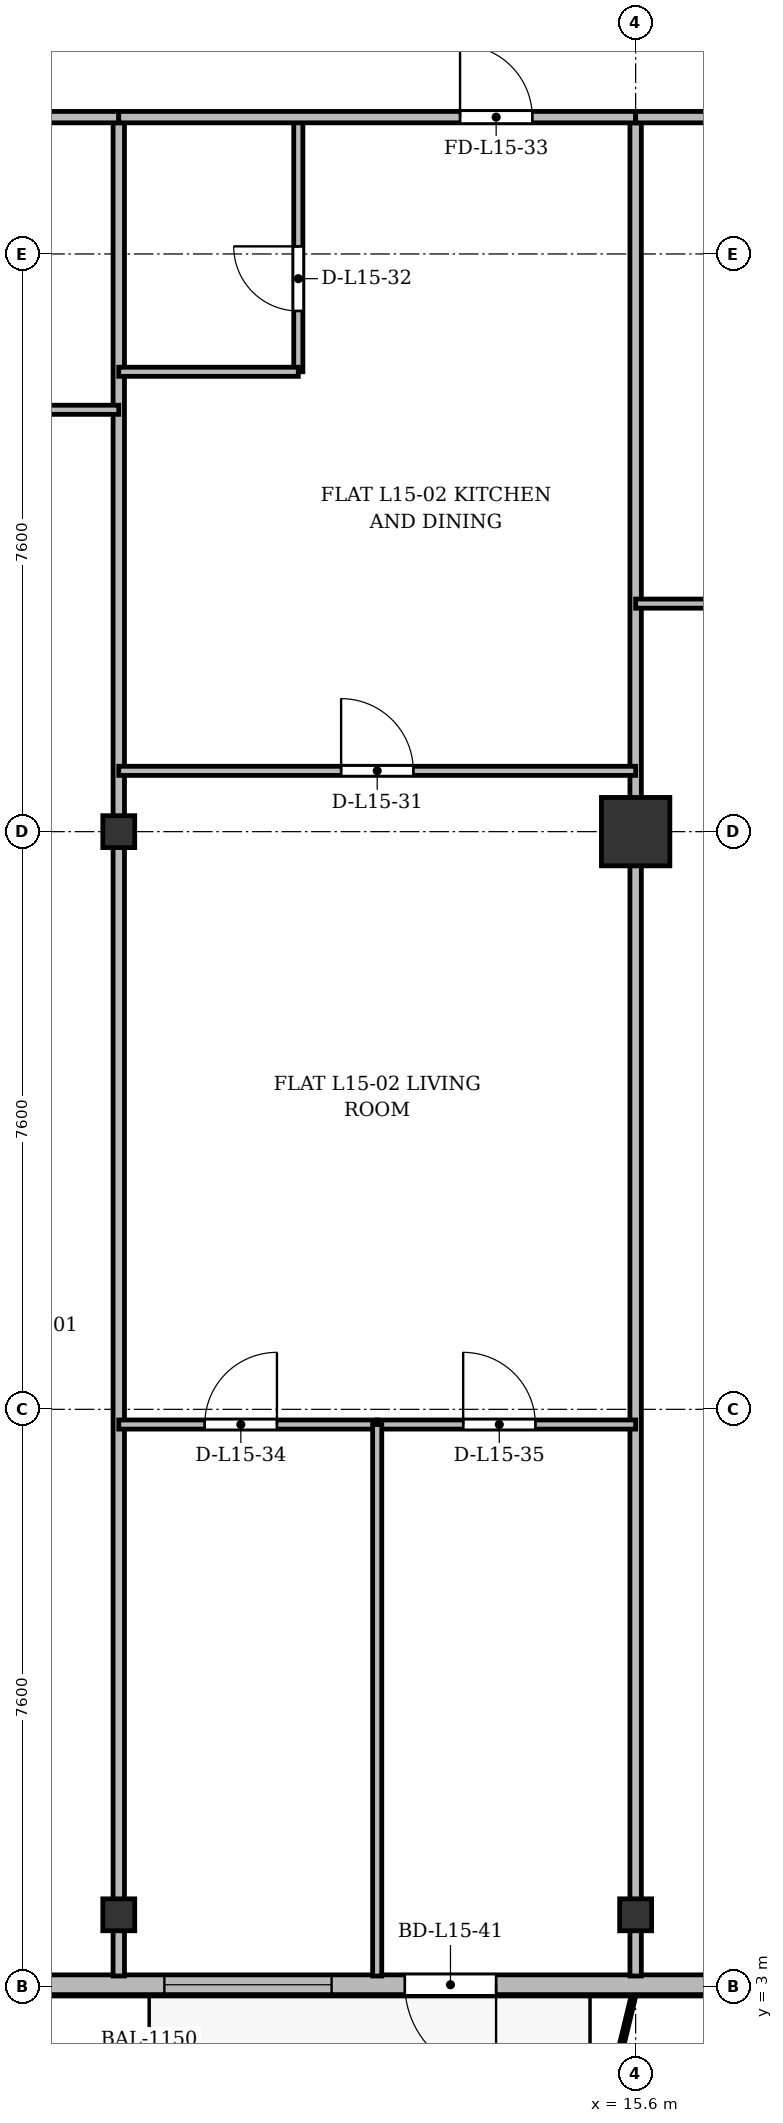
"""IFC4 building model, lengths in metres.
Left out: names, types, materials, properties, quantities, classifications, styles, units other than length and angle.
Written with IfcOpenShell. Run it as: python <this file> out.ifc"""

import sys

from ifc_helpers import new_model, si_unit, direction, frame, frame_2d, origin, origin_2d, place, context, subcontext, project, spatial, rectangle, i_section, extrude, source, transform, mapped, element, fill, save


model = new_model("IFC4")
c1 = context("Model", 3, precision=1e-05, world=origin(), true_north=direction((0.0, 1.0)))
c2 = subcontext(c1, "Body", "Model", "MODEL_VIEW")
j1 = project(units=[si_unit("LENGTHUNIT", "METRE"), si_unit("PLANEANGLEUNIT", "RADIAN")], contexts=[c1])
p1 = place(None, origin())
s1 = spatial("IfcSite", under=j1, at=p1, CompositionType="ELEMENT")
p2 = place(p1, origin())
s2 = spatial("IfcBuilding", under=s1, at=p2, CompositionType="ELEMENT")
p3 = place(p2, frame((0.0, 0.0, 59.5)))
s3 = spatial("IfcBuildingStorey", under=s2, at=p3, CompositionType="ELEMENT", Elevation=59.5)
m1 = source(origin(), c2, "Body", "SweptSolid", [
    extrude(i_section(OverallWidth=0.42, OverallDepth=0.42, WebThickness=0.026, FlangeThickness=0.04, at=origin_2d()), origin(), (0.0, 0.0, 1.0), 3.6),
])
for number, where, z_axis, x_axis in (
    (1, (8.8, 3.95, 0.0), (0.0, 0.0, 1.0), (1.0, 0.0, 0.0)),
    (2, (8.8, 18.2, 0.0), (0.0, 0.0, 1.0), (1.0, 0.0, 0.0)),
    (3, (15.6, 3.95, 0.0), (0.0, 0.0, 1.0), (1.0, 0.0, 0.0)),
):
    element("IfcColumn", number, at=place(p3, frame(where, z_axis=z_axis, x_axis=x_axis)), inside=s3, PredefinedType="COLUMN", context=c2, shape_type="MappedRepresentation", body=[
        mapped(m1, transform((0.0, 0.0, 0.0), x_axis=(1.0, 0.0, 0.0), y_axis=(0.0, 1.0, 0.0), z_axis=(0.0, 0.0, 1.0), scale=1.0)),
    ])
m2 = source(origin(), c2, "Body", "SweptSolid", [
    extrude(rectangle(XDim=0.9, YDim=0.9, at=origin_2d()), origin(), (0.0, 0.0, 1.0), 3.6),
])
p4 = place(p3, frame((15.6, 18.2, 0.0), z_axis=(0.0, 0.0, 1.0), x_axis=(1.0, 0.0, 0.0)))
e4 = element("IfcColumn", 4, at=p4, inside=s3, PredefinedType="COLUMN", context=c2, shape_type="MappedRepresentation", body=[
    mapped(m2, transform((0.0, 0.0, 0.0), x_axis=(1.0, 0.0, 0.0), y_axis=(0.0, 1.0, 0.0), z_axis=(0.0, 0.0, 1.0), scale=1.0)),
])
p5 = place(p3, frame((66.9, 3.03, 0.0), z_axis=(0.0, 0.0, 1.0), x_axis=(-1.0, 0.0, 0.0)))
e5 = element("IfcWall", 5, at=p5, inside=s3, PredefinedType="SOLIDWALL", context=c2, shape_type="SweptSolid", body=[
    extrude(rectangle(XDim=59.4, YDim=0.26, at=frame_2d((29.7, 0.0))), origin(), (0.0, 0.0, 1.0), 3.34),
])
p6 = place(p5, frame((3.6, 0.0, 0.9)))
e6 = element("IfcOpeningElement", 6, at=p6, cuts=e5, PredefinedType="OPENING", context=c2, shape_type="SweptSolid", body=[
    extrude(rectangle(XDim=2.2, YDim=1.8, at=frame_2d((1.1, 0.9))), frame((0.0, 0.14, 0.0), z_axis=(0.0, -1.0, 0.0), x_axis=(1.0, 0.0, 0.0)), (0.0, 0.0, 1.0), 0.28),
])
p7 = place(p5, frame((9.18, 0.0, 0.0)))
e7 = element("IfcOpeningElement", 7, at=p7, cuts=e5, PredefinedType="OPENING", context=c2, shape_type="SweptSolid", body=[
    extrude(rectangle(XDim=1.2, YDim=2.2, at=frame_2d((0.6, 1.1))), frame((0.0, 0.14, 0.0), z_axis=(0.0, -1.0, 0.0), x_axis=(1.0, 0.0, 0.0)), (0.0, 0.0, 1.0), 0.28),
])
p8 = place(p5, frame((12.95, 0.0, 0.9)))
e8 = element("IfcOpeningElement", 8, at=p8, cuts=e5, PredefinedType="OPENING", context=c2, shape_type="SweptSolid", body=[
    extrude(rectangle(XDim=2.0, YDim=1.95, at=frame_2d((1.0, 0.975))), frame((0.0, 0.14, 0.0), z_axis=(0.0, -1.0, 0.0), x_axis=(1.0, 0.0, 0.0)), (0.0, 0.0, 1.0), 0.28),
])
p9 = place(p5, frame((18.675, 0.0, 0.9)))
e9 = element("IfcOpeningElement", 9, at=p9, cuts=e5, PredefinedType="OPENING", context=c2, shape_type="SweptSolid", body=[
    extrude(rectangle(XDim=1.65, YDim=1.85, at=frame_2d((0.825, 0.925))), frame((0.0, 0.14, 0.0), z_axis=(0.0, -1.0, 0.0), x_axis=(1.0, 0.0, 0.0)), (0.0, 0.0, 1.0), 0.28),
])
p10 = place(p5, frame((24.1, 0.0, 0.9)))
e10 = element("IfcOpeningElement", 10, at=p10, cuts=e5, PredefinedType="OPENING", context=c2, shape_type="SweptSolid", body=[
    extrude(rectangle(XDim=1.8, YDim=1.8, at=frame_2d((0.9, 0.9))), frame((0.0, 0.14, 0.0), z_axis=(0.0, -1.0, 0.0), x_axis=(1.0, 0.0, 0.0)), (0.0, 0.0, 1.0), 0.28),
])
p11 = place(p5, frame((28.1, 0.0, 0.9)))
e11 = element("IfcOpeningElement", 11, at=p11, cuts=e5, PredefinedType="OPENING", context=c2, shape_type="SweptSolid", body=[
    extrude(rectangle(XDim=2.2, YDim=1.8, at=frame_2d((1.1, 0.9))), frame((0.0, 0.14, 0.0), z_axis=(0.0, -1.0, 0.0), x_axis=(1.0, 0.0, 0.0)), (0.0, 0.0, 1.0), 0.28),
])
p12 = place(p5, frame((33.15, 0.0, 0.9)))
e12 = element("IfcOpeningElement", 12, at=p12, cuts=e5, PredefinedType="OPENING", context=c2, shape_type="SweptSolid", body=[
    extrude(rectangle(XDim=1.5, YDim=1.75, at=frame_2d((0.75, 0.875))), frame((0.0, 0.14, 0.0), z_axis=(0.0, -1.0, 0.0), x_axis=(1.0, 0.0, 0.0)), (0.0, 0.0, 1.0), 0.28),
])
p13 = place(p5, frame((40.301, 0.0, 0.0)))
e13 = element("IfcOpeningElement", 13, at=p13, cuts=e5, PredefinedType="OPENING", context=c2, shape_type="SweptSolid", body=[
    extrude(rectangle(XDim=1.2, YDim=2.2, at=frame_2d((0.6, 1.1))), frame((0.0, 0.14, 0.0), z_axis=(0.0, -1.0, 0.0), x_axis=(1.0, 0.0, 0.0)), (0.0, 0.0, 1.0), 0.28),
])
p14 = place(p5, frame((46.575, 0.0, 0.9)))
e14 = element("IfcOpeningElement", 14, at=p14, cuts=e5, PredefinedType="OPENING", context=c2, shape_type="SweptSolid", body=[
    extrude(rectangle(XDim=1.65, YDim=1.85, at=frame_2d((0.825, 0.925))), frame((0.0, 0.14, 0.0), z_axis=(0.0, -1.0, 0.0), x_axis=(1.0, 0.0, 0.0)), (0.0, 0.0, 1.0), 0.28),
])
p15 = place(p5, frame((53.136, 0.0, 0.0)))
e15 = element("IfcOpeningElement", 15, at=p15, cuts=e5, PredefinedType="OPENING", context=c2, shape_type="SweptSolid", body=[
    extrude(rectangle(XDim=1.2, YDim=2.2, at=frame_2d((0.6, 1.1))), frame((0.0, 0.14, 0.0), z_axis=(0.0, -1.0, 0.0), x_axis=(1.0, 0.0, 0.0)), (0.0, 0.0, 1.0), 0.28),
])
p16 = place(p5, frame((55.3, 0.0, 0.9)))
e16 = element("IfcOpeningElement", 16, at=p16, cuts=e5, PredefinedType="OPENING", context=c2, shape_type="SweptSolid", body=[
    extrude(rectangle(XDim=2.2, YDim=1.8, at=frame_2d((1.1, 0.9))), frame((0.0, 0.14, 0.0), z_axis=(0.0, -1.0, 0.0), x_axis=(1.0, 0.0, 0.0)), (0.0, 0.0, 1.0), 0.28),
])
for number, where, z_axis, x_axis in (
    (17, (8.8, 3.145, 0.0), (0.0, 0.0, 1.0), (0.0, 1.0, 0.0)),
    (18, (15.6, 3.145, 0.0), (0.0, 0.0, 1.0), (0.0, 1.0, 0.0)),
):
    element("IfcWall", number, at=place(p3, frame(where, z_axis=z_axis, x_axis=x_axis)), inside=s3, PredefinedType="PARTITIONING", context=c2, shape_type="SweptSolid", body=[
        extrude(rectangle(XDim=24.455, YDim=0.15, at=frame_2d((12.228, 0.0))), origin(), (0.0, 0.0, 1.0), 2.752),
    ])
p17 = place(p3, frame((4.745, 27.6, 0.0), z_axis=(0.0, 0.0, 1.0), x_axis=(1.0, 0.0, 0.0)))
e19 = element("IfcWall", 19, at=p17, inside=s3, PredefinedType="PARTITIONING", context=c2, shape_type="SweptSolid", body=[
    extrude(rectangle(XDim=4.055, YDim=0.15, at=frame_2d((2.027, 0.0))), origin(), (0.0, 0.0, 1.0), 2.752),
])
p18 = place(p17, frame((1.462, 0.0, 0.0)))
e20 = element("IfcOpeningElement", 20, at=p18, cuts=e19, PredefinedType="OPENING", context=c2, shape_type="SweptSolid", body=[
    extrude(rectangle(XDim=0.95, YDim=2.15, at=frame_2d((0.475, 1.075))), frame((0.0, 0.085, 0.0), z_axis=(0.0, -1.0, 0.0), x_axis=(1.0, 0.0, 0.0)), (0.0, 0.0, 1.0), 0.17),
])
p19 = place(p3, frame((4.745, 23.75, 0.0), z_axis=(0.0, 0.0, 1.0), x_axis=(1.0, 0.0, 0.0)))
e21 = element("IfcWall", 21, at=p19, inside=s3, PredefinedType="PARTITIONING", context=c2, shape_type="SweptSolid", body=[
    extrude(rectangle(XDim=4.055, YDim=0.12, at=frame_2d((2.027, 0.0))), origin(), (0.0, 0.0, 1.0), 2.752),
])
p20 = place(p19, frame((1.462, 0.0, 0.0)))
e22 = element("IfcOpeningElement", 22, at=p20, cuts=e21, PredefinedType="OPENING", context=c2, shape_type="SweptSolid", body=[
    extrude(rectangle(XDim=0.95, YDim=2.15, at=frame_2d((0.475, 1.075))), frame((0.0, 0.07, 0.0), z_axis=(0.0, -1.0, 0.0), x_axis=(1.0, 0.0, 0.0)), (0.0, 0.0, 1.0), 0.14),
])
p21 = place(p3, frame((8.8, 19.0, 0.0), z_axis=(0.0, 0.0, 1.0), x_axis=(1.0, 0.0, 0.0)))
e23 = element("IfcWall", 23, at=p21, inside=s3, PredefinedType="PARTITIONING", context=c2, shape_type="SweptSolid", body=[
    extrude(rectangle(XDim=6.8, YDim=0.12, at=frame_2d((3.4, 0.0))), origin(), (0.0, 0.0, 1.0), 2.752),
])
p22 = place(p21, frame((2.925, 0.0, 0.0)))
e24 = element("IfcOpeningElement", 24, at=p22, cuts=e23, PredefinedType="OPENING", context=c2, shape_type="SweptSolid", body=[
    extrude(rectangle(XDim=0.95, YDim=2.15, at=frame_2d((0.475, 1.075))), frame((0.0, 0.07, 0.0), z_axis=(0.0, -1.0, 0.0), x_axis=(1.0, 0.0, 0.0)), (0.0, 0.0, 1.0), 0.14),
])
p23 = place(p3, frame((11.162, 24.25, 0.0), z_axis=(0.0, 0.0, 1.0), x_axis=(0.0, 1.0, 0.0)))
e25 = element("IfcWall", 25, at=p23, inside=s3, PredefinedType="PARTITIONING", context=c2, shape_type="SweptSolid", body=[
    extrude(rectangle(XDim=3.35, YDim=0.12, at=frame_2d((1.675, 0.0))), origin(), (0.0, 0.0, 1.0), 2.94),
])
p24 = place(p23, frame((0.8, 0.0, 0.0)))
e26 = element("IfcOpeningElement", 26, at=p24, cuts=e25, PredefinedType="OPENING", context=c2, shape_type="SweptSolid", body=[
    extrude(rectangle(XDim=0.85, YDim=2.1, at=frame_2d((0.425, 1.05))), frame((0.0, 0.07, 0.0), z_axis=(0.0, -1.0, 0.0), x_axis=(1.0, 0.0, 0.0)), (0.0, 0.0, 1.0), 0.14),
])
p25 = place(p3, frame((8.8, 24.25, 0.0), z_axis=(0.0, 0.0, 1.0), x_axis=(1.0, 0.0, 0.0)))
e27 = element("IfcWall", 27, at=p25, inside=s3, PredefinedType="PARTITIONING", context=c2, shape_type="SweptSolid", body=[
    extrude(rectangle(XDim=2.362, YDim=0.12, at=frame_2d((1.181, 0.0))), origin(), (0.0, 0.0, 1.0), 2.752),
])
p26 = place(p3, frame((8.8, 27.6, 0.0), z_axis=(0.0, 0.0, 1.0), x_axis=(1.0, 0.0, 0.0)))
e28 = element("IfcWall", 28, at=p26, inside=s3, PredefinedType="PARTITIONING", context=c2, shape_type="SweptSolid", body=[
    extrude(rectangle(XDim=6.8, YDim=0.15, at=frame_2d((3.4, 0.0))), origin(), (0.0, 0.0, 1.0), 2.752),
])
p27 = place(p26, frame((4.49, 0.0, 0.0)))
e29 = element("IfcOpeningElement", 29, at=p27, cuts=e28, PredefinedType="OPENING", context=c2, shape_type="SweptSolid", body=[
    extrude(rectangle(XDim=0.95, YDim=2.15, at=frame_2d((0.475, 1.075))), frame((0.0, 0.085, 0.0), z_axis=(0.0, -1.0, 0.0), x_axis=(1.0, 0.0, 0.0)), (0.0, 0.0, 1.0), 0.17),
])
p28 = place(p3, frame((8.8, 10.4, 0.0), z_axis=(0.0, 0.0, 1.0), x_axis=(1.0, 0.0, 0.0)))
e30 = element("IfcWall", 30, at=p28, inside=s3, PredefinedType="PARTITIONING", context=c2, shape_type="SweptSolid", body=[
    extrude(rectangle(XDim=3.4, YDim=0.12, at=frame_2d((1.7, 0.0))), origin(), (0.0, 0.0, 1.0), 2.752),
])
p29 = place(p28, frame((1.131, 0.0, 0.0)))
e31 = element("IfcOpeningElement", 31, at=p29, cuts=e30, PredefinedType="OPENING", context=c2, shape_type="SweptSolid", body=[
    extrude(rectangle(XDim=0.95, YDim=2.15, at=frame_2d((0.475, 1.075))), frame((0.0, 0.07, 0.0), z_axis=(0.0, -1.0, 0.0), x_axis=(1.0, 0.0, 0.0)), (0.0, 0.0, 1.0), 0.14),
])
p30 = place(p3, frame((12.2, 10.4, 0.0), z_axis=(0.0, 0.0, 1.0), x_axis=(1.0, 0.0, 0.0)))
e32 = element("IfcWall", 32, at=p30, inside=s3, PredefinedType="PARTITIONING", context=c2, shape_type="SweptSolid", body=[
    extrude(rectangle(XDim=3.4, YDim=0.12, at=frame_2d((1.7, 0.0))), origin(), (0.0, 0.0, 1.0), 2.752),
])
p31 = place(p30, frame((1.131, 0.0, 0.0)))
e33 = element("IfcOpeningElement", 33, at=p31, cuts=e32, PredefinedType="OPENING", context=c2, shape_type="SweptSolid", body=[
    extrude(rectangle(XDim=0.95, YDim=2.15, at=frame_2d((0.475, 1.075))), frame((0.0, 0.07, 0.0), z_axis=(0.0, -1.0, 0.0), x_axis=(1.0, 0.0, 0.0)), (0.0, 0.0, 1.0), 0.14),
])
p32 = place(p3, frame((12.2, 3.145, 0.0), z_axis=(0.0, 0.0, 1.0), x_axis=(0.0, 1.0, 0.0)))
e34 = element("IfcWall", 34, at=p32, inside=s3, PredefinedType="PARTITIONING", context=c2, shape_type="SweptSolid", body=[
    extrude(rectangle(XDim=7.255, YDim=0.12, at=frame_2d((3.627, 0.0))), origin(), (0.0, 0.0, 1.0), 2.69),
])
p33 = place(p3, frame((15.6, 27.6, 0.0), z_axis=(0.0, 0.0, 1.0), x_axis=(1.0, 0.0, 0.0)))
e35 = element("IfcWall", 35, at=p33, inside=s3, PredefinedType="PARTITIONING", context=c2, shape_type="SweptSolid", body=[
    extrude(rectangle(XDim=7.8, YDim=0.15, at=frame_2d((3.9, 0.0))), origin(), (0.0, 0.0, 1.0), 2.752),
])
p34 = place(p33, frame((3.333, 0.0, 0.0)))
e36 = element("IfcOpeningElement", 36, at=p34, cuts=e35, PredefinedType="OPENING", context=c2, shape_type="SweptSolid", body=[
    extrude(rectangle(XDim=0.95, YDim=2.15, at=frame_2d((0.475, 1.075))), frame((0.0, 0.085, 0.0), z_axis=(0.0, -1.0, 0.0), x_axis=(1.0, 0.0, 0.0)), (0.0, 0.0, 1.0), 0.17),
])
p35 = place(p3, frame((15.6, 21.2, 0.0), z_axis=(0.0, 0.0, 1.0), x_axis=(1.0, 0.0, 0.0)))
e37 = element("IfcWall", 37, at=p35, inside=s3, PredefinedType="PARTITIONING", context=c2, shape_type="SweptSolid", body=[
    extrude(rectangle(XDim=7.8, YDim=0.12, at=frame_2d((3.9, 0.0))), origin(), (0.0, 0.0, 1.0), 2.752),
])
p36 = place(p35, frame((3.333, 0.0, 0.0)))
e38 = element("IfcOpeningElement", 38, at=p36, cuts=e37, PredefinedType="OPENING", context=c2, shape_type="SweptSolid", body=[
    extrude(rectangle(XDim=0.95, YDim=2.15, at=frame_2d((0.475, 1.075))), frame((0.0, 0.07, 0.0), z_axis=(0.0, -1.0, 0.0), x_axis=(1.0, 0.0, 0.0)), (0.0, 0.0, 1.0), 0.14),
])
m3 = source(origin(), c2, "Body", "SweptSolid", [
    extrude(rectangle(XDim=1.2, YDim=2.2, at=frame_2d((0.6, 1.1))), frame((0.0, 0.025, 0.0), z_axis=(0.0, -1.0, 0.0), x_axis=(1.0, 0.0, 0.0)), (0.0, 0.0, 1.0), 0.05),
])
p37 = place(p15, origin())
e39 = element("IfcDoor", 39, at=p37, inside=s3, OperationType="SINGLE_SWING_LEFT", PredefinedType="DOOR", context=c2, shape_type="MappedRepresentation", body=[
    mapped(m3, transform((0.0, 0.0, 0.0), x_axis=(1.0, 0.0, 0.0), y_axis=(0.0, 1.0, 0.0), z_axis=(0.0, 0.0, 1.0), scale=1.0)),
])
fill(e15, e39)
m4 = source(origin(), c2, "Body", "SweptSolid", [
    extrude(rectangle(XDim=2.2, YDim=1.8, at=frame_2d((1.1, 0.9))), frame((0.0, 0.03, 0.0), z_axis=(0.0, -1.0, 0.0), x_axis=(1.0, 0.0, 0.0)), (0.0, 0.0, 1.0), 0.06),
])
p38 = place(p16, origin())
e40 = element("IfcWindow", 40, at=p38, inside=s3, PartitioningType="SINGLE_PANEL", PredefinedType="WINDOW", context=c2, shape_type="MappedRepresentation", body=[
    mapped(m4, transform((0.0, 0.0, 0.0), x_axis=(1.0, 0.0, 0.0), y_axis=(0.0, 1.0, 0.0), z_axis=(0.0, 0.0, 1.0), scale=1.0)),
])
fill(e16, e40)
m5 = source(origin(), c2, "Body", "SweptSolid", [
    extrude(rectangle(XDim=0.95, YDim=2.15, at=frame_2d((0.475, 1.075))), frame((0.0, 0.025, 0.0), z_axis=(0.0, -1.0, 0.0), x_axis=(1.0, 0.0, 0.0)), (0.0, 0.0, 1.0), 0.05),
])
p39 = place(p22, origin())
e41 = element("IfcDoor", 41, at=p39, inside=s3, OperationType="SINGLE_SWING_LEFT", PredefinedType="DOOR", context=c2, shape_type="MappedRepresentation", body=[
    mapped(m5, transform((0.0, 0.0, 0.0), x_axis=(1.0, 0.0, 0.0), y_axis=(0.0, 1.0, 0.0), z_axis=(0.0, 0.0, 1.0), scale=1.0)),
])
fill(e24, e41)
m6 = source(origin(), c2, "Body", "SweptSolid", [
    extrude(rectangle(XDim=0.85, YDim=2.1, at=frame_2d((0.425, 1.05))), frame((0.0, 0.025, 0.0), z_axis=(0.0, -1.0, 0.0), x_axis=(1.0, 0.0, 0.0)), (0.0, 0.0, 1.0), 0.05),
])
p40 = place(p24, origin())
e42 = element("IfcDoor", 42, at=p40, inside=s3, OperationType="SINGLE_SWING_RIGHT", PredefinedType="DOOR", context=c2, shape_type="MappedRepresentation", body=[
    mapped(m6, transform((0.0, 0.0, 0.0), x_axis=(1.0, 0.0, 0.0), y_axis=(0.0, 1.0, 0.0), z_axis=(0.0, 0.0, 1.0), scale=1.0)),
])
fill(e26, e42)
p41 = place(p27, origin())
e43 = element("IfcDoor", 43, at=p41, inside=s3, OperationType="SINGLE_SWING_LEFT", PredefinedType="DOOR", context=c2, shape_type="MappedRepresentation", body=[
    mapped(m5, transform((0.0, 0.0, 0.0), x_axis=(1.0, 0.0, 0.0), y_axis=(0.0, 1.0, 0.0), z_axis=(0.0, 0.0, 1.0), scale=1.0)),
])
fill(e29, e43)
p42 = place(p29, origin())
e44 = element("IfcDoor", 44, at=p42, inside=s3, OperationType="SINGLE_SWING_RIGHT", PredefinedType="DOOR", context=c2, shape_type="MappedRepresentation", body=[
    mapped(m5, transform((0.0, 0.0, 0.0), x_axis=(1.0, 0.0, 0.0), y_axis=(0.0, 1.0, 0.0), z_axis=(0.0, 0.0, 1.0), scale=1.0)),
])
fill(e31, e44)
p43 = place(p31, origin())
e45 = element("IfcDoor", 45, at=p43, inside=s3, OperationType="SINGLE_SWING_LEFT", PredefinedType="DOOR", context=c2, shape_type="MappedRepresentation", body=[
    mapped(m5, transform((0.0, 0.0, 0.0), x_axis=(1.0, 0.0, 0.0), y_axis=(0.0, 1.0, 0.0), z_axis=(0.0, 0.0, 1.0), scale=1.0)),
])
fill(e33, e45)
save(model, sys.argv[1])
